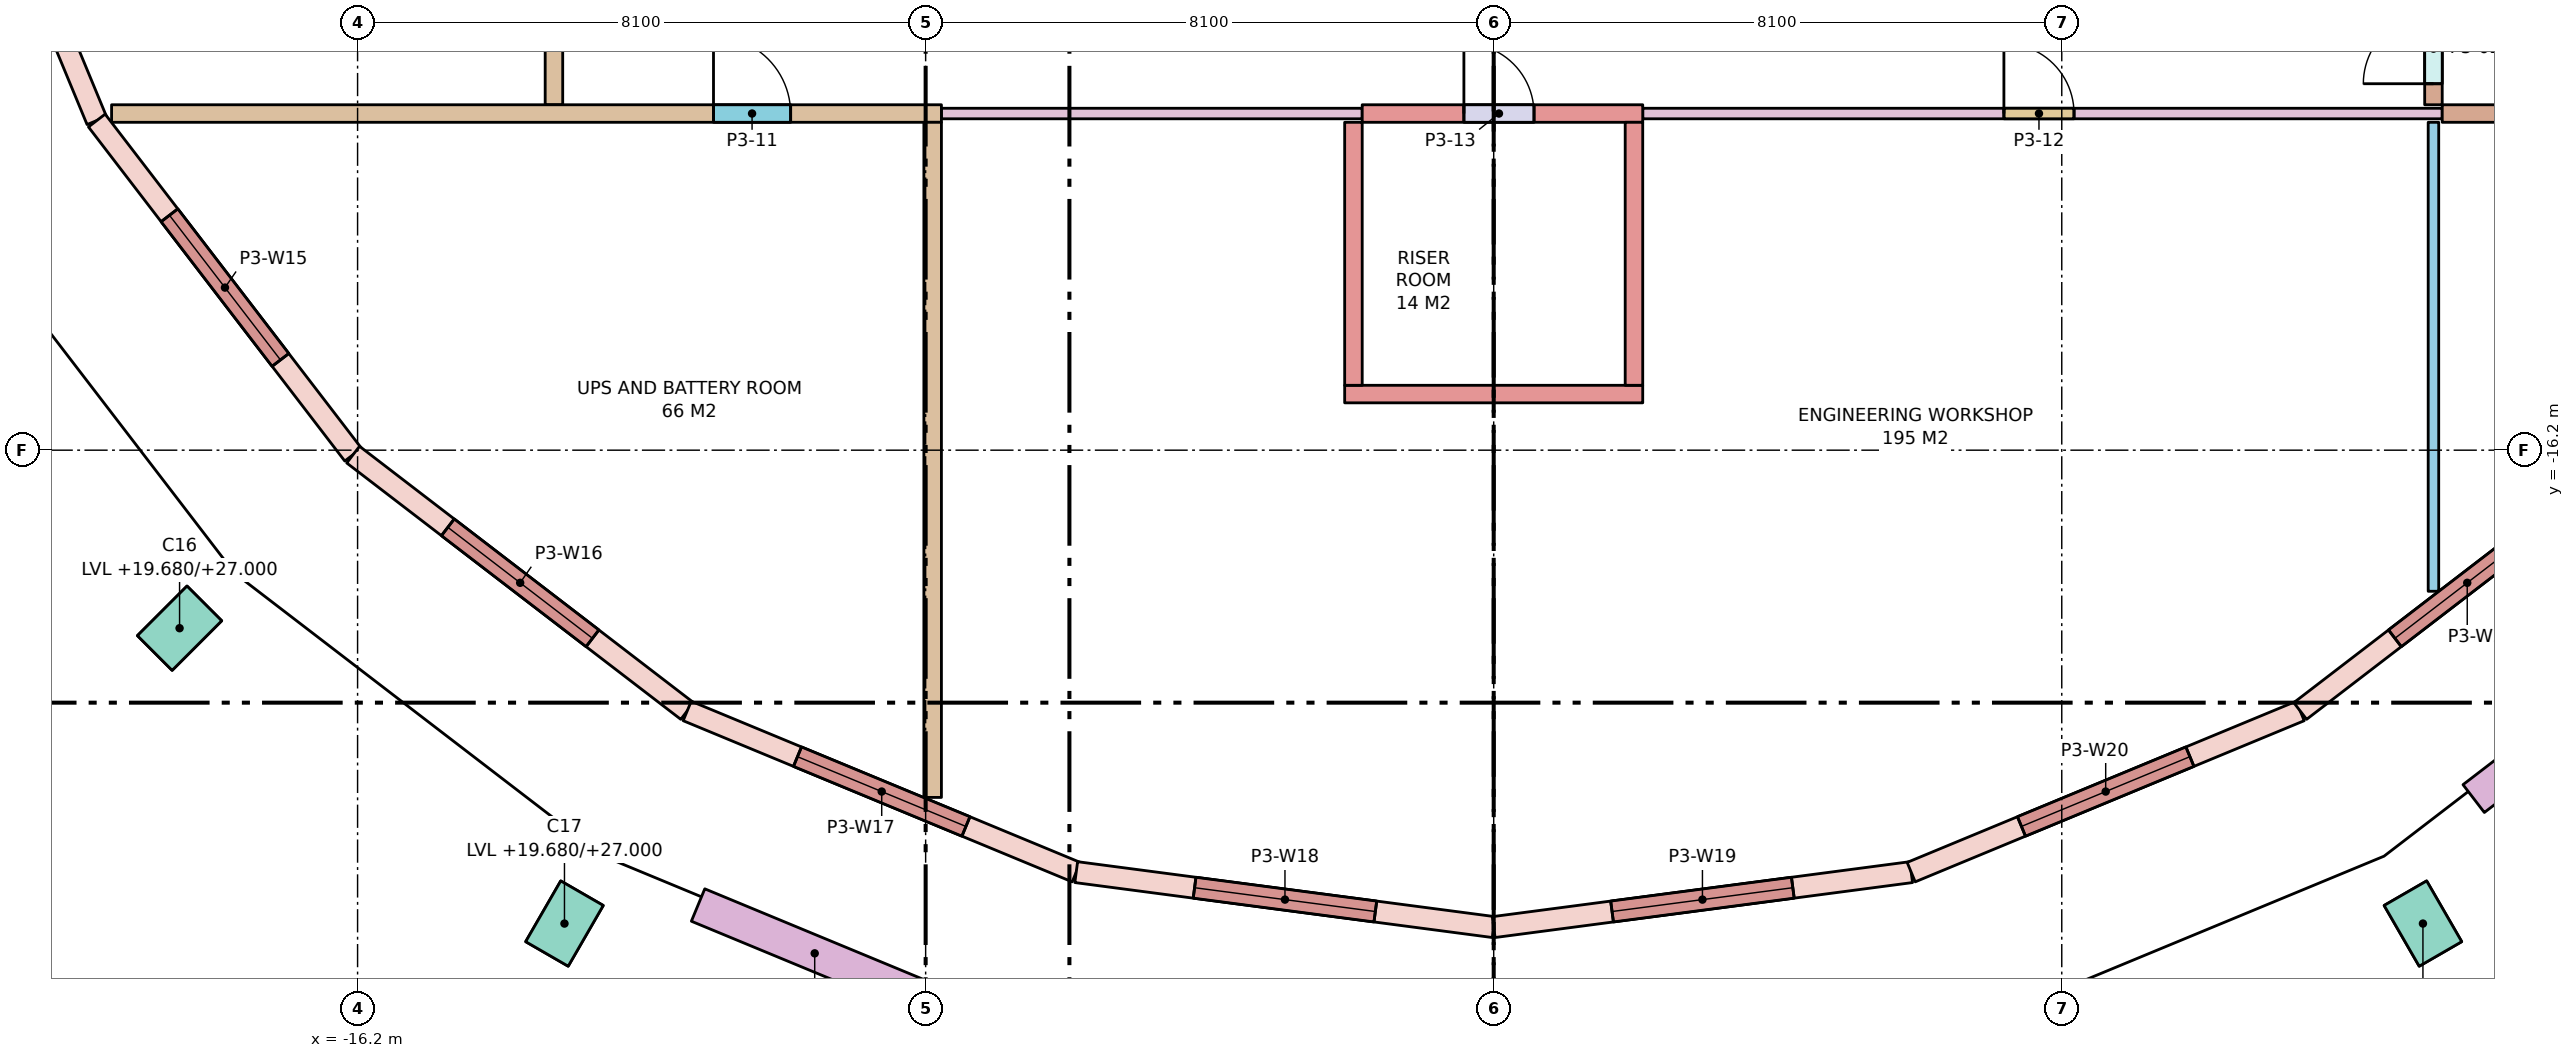
"""IFC4 building model, lengths in metres.
Left out: names, types, materials, properties, quantities, classifications, styles, units other than length and angle.
Written with IfcOpenShell. Run it as: python <this file> out.ifc"""

import sys

from ifc_helpers import new_model, si_unit, direction, frame, frame_2d, origin, origin_2d, place, context, subcontext, project, spatial, rectangle, extrude, element, fill, save


model = new_model("IFC4")
c1 = context("Model", 3, precision=1e-05, world=origin(), true_north=direction((0.0, 1.0)))
c2 = subcontext(c1, "Body", "Model", "MODEL_VIEW")
j1 = project(units=[si_unit("LENGTHUNIT", "METRE"), si_unit("PLANEANGLEUNIT", "RADIAN")], contexts=[c1])
p1 = place(None, origin())
s1 = spatial("IfcSite", under=j1, at=p1, CompositionType="ELEMENT")
p2 = place(p1, origin())
s2 = spatial("IfcBuilding", under=s1, at=p2, CompositionType="ELEMENT")
p3 = place(p2, frame((0.0, 0.0, 20.0)))
s3 = spatial("IfcBuildingStorey", under=s2, at=p3, CompositionType="ELEMENT", Elevation=20.0)
for number, where, z_axis, x_axis in (
    (1, (-18.738, -18.738, -0.32), (0.0, 0.0, 1.0), (0.707, -0.707, 0.0)),
    (2, (-13.25, -22.95, -0.32), (0.0, 0.0, 1.0), (0.866, -0.5, 0.0)),
    (3, (13.25, -22.95, -0.32), (0.0, 0.0, 1.0), (0.866, 0.5, 0.0)),
):
    element("IfcColumn", number, at=place(p3, frame(where, z_axis=z_axis, x_axis=x_axis)), inside=s3, PredefinedType="COLUMN", context=c2, shape_type="SweptSolid", body=[
        extrude(rectangle(XDim=0.7, YDim=1.0, at=origin_2d()), origin(), (0.0, 0.0, 1.0), 7.32),
    ])
p4 = place(p3, frame((-22.216, -5.953, 0.0), z_axis=(0.0, 0.0, 1.0), x_axis=(0.382671411433, -0.923884511653, 0.0)))
e4 = element("IfcWall", 4, at=p4, inside=s3, PredefinedType="STANDARD", context=c2, shape_type="SweptSolid", body=[
    extrude(rectangle(XDim=6.004, YDim=0.3, at=frame_2d((3.002, 0.0))), origin(), (0.0, 0.0, 1.0), 6.72),
])
p5 = place(p4, frame((1.702, 0.0, 0.8)))
e5 = element("IfcOpeningElement", 5, at=p5, cuts=e4, PredefinedType="OPENING", context=c2, shape_type="SweptSolid", body=[
    extrude(rectangle(XDim=2.6, YDim=5.4, at=frame_2d((1.3, 2.7))), frame((0.0, 0.16, 0.0), z_axis=(0.0, -1.0, 0.0), x_axis=(1.0, 0.0, 0.0)), (0.0, 0.0, 1.0), 0.32),
])
p6 = place(p3, frame((-19.919, -11.5, 0.0), z_axis=(0.0, 0.0, 1.0), x_axis=(0.608778912074, -0.793339924758, 0.0)))
e6 = element("IfcWall", 6, at=p6, inside=s3, PredefinedType="STANDARD", context=c2, shape_type="SweptSolid", body=[
    extrude(rectangle(XDim=6.004, YDim=0.3, at=frame_2d((3.002, 0.0))), origin(), (0.0, 0.0, 1.0), 6.72),
])
p7 = place(p6, frame((1.702, 0.0, 0.8)))
e7 = element("IfcOpeningElement", 7, at=p7, cuts=e6, PredefinedType="OPENING", context=c2, shape_type="SweptSolid", body=[
    extrude(rectangle(XDim=2.6, YDim=5.4, at=frame_2d((1.3, 2.7))), frame((0.0, 0.16, 0.0), z_axis=(0.0, -1.0, 0.0), x_axis=(1.0, 0.0, 0.0)), (0.0, 0.0, 1.0), 0.32),
])
p8 = place(p3, frame((-16.263, -16.263, 0.0), z_axis=(0.0, 0.0, 1.0), x_axis=(0.793339924758, -0.608778912074, 0.0)))
e8 = element("IfcWall", 8, at=p8, inside=s3, PredefinedType="STANDARD", context=c2, shape_type="SweptSolid", body=[
    extrude(rectangle(XDim=6.004, YDim=0.3, at=frame_2d((3.002, 0.0))), origin(), (0.0, 0.0, 1.0), 6.72),
])
p9 = place(p8, frame((1.702, 0.0, 0.8)))
e9 = element("IfcOpeningElement", 9, at=p9, cuts=e8, PredefinedType="OPENING", context=c2, shape_type="SweptSolid", body=[
    extrude(rectangle(XDim=2.6, YDim=5.4, at=frame_2d((1.3, 2.7))), frame((0.0, 0.16, 0.0), z_axis=(0.0, -1.0, 0.0), x_axis=(1.0, 0.0, 0.0)), (0.0, 0.0, 1.0), 0.32),
])
p10 = place(p3, frame((-11.5, -19.919, 0.0), z_axis=(0.0, 0.0, 1.0), x_axis=(0.923884511653, -0.382671411433, 0.0)))
e10 = element("IfcWall", 10, at=p10, inside=s3, PredefinedType="STANDARD", context=c2, shape_type="SweptSolid", body=[
    extrude(rectangle(XDim=6.004, YDim=0.3, at=frame_2d((3.002, 0.0))), origin(), (0.0, 0.0, 1.0), 6.72),
])
p11 = place(p10, frame((1.702, 0.0, 0.8)))
e11 = element("IfcOpeningElement", 11, at=p11, cuts=e10, PredefinedType="OPENING", context=c2, shape_type="SweptSolid", body=[
    extrude(rectangle(XDim=2.6, YDim=5.4, at=frame_2d((1.3, 2.7))), frame((0.0, 0.16, 0.0), z_axis=(0.0, -1.0, 0.0), x_axis=(1.0, 0.0, 0.0)), (0.0, 0.0, 1.0), 0.32),
])
p12 = place(p3, frame((-5.953, -22.216, 0.0), z_axis=(0.0, 0.0, 1.0), x_axis=(0.991445297315, -0.130522880875, 0.0)))
e12 = element("IfcWall", 12, at=p12, inside=s3, PredefinedType="STANDARD", context=c2, shape_type="SweptSolid", body=[
    extrude(rectangle(XDim=6.004, YDim=0.3, at=frame_2d((3.002, 0.0))), origin(), (0.0, 0.0, 1.0), 6.72),
])
p13 = place(p12, frame((1.702, 0.0, 0.8)))
e13 = element("IfcOpeningElement", 13, at=p13, cuts=e12, PredefinedType="OPENING", context=c2, shape_type="SweptSolid", body=[
    extrude(rectangle(XDim=2.6, YDim=5.4, at=frame_2d((1.3, 2.7))), frame((0.0, 0.16, 0.0), z_axis=(0.0, -1.0, 0.0), x_axis=(1.0, 0.0, 0.0)), (0.0, 0.0, 1.0), 0.32),
])
p14 = place(p3, frame((0.0, -23.0, 0.0), z_axis=(0.0, 0.0, 1.0), x_axis=(0.991445297315, 0.130522880875, 0.0)))
e14 = element("IfcWall", 14, at=p14, inside=s3, PredefinedType="STANDARD", context=c2, shape_type="SweptSolid", body=[
    extrude(rectangle(XDim=6.004, YDim=0.3, at=frame_2d((3.002, 0.0))), origin(), (0.0, 0.0, 1.0), 6.72),
])
p15 = place(p14, frame((1.702, 0.0, 0.8)))
e15 = element("IfcOpeningElement", 15, at=p15, cuts=e14, PredefinedType="OPENING", context=c2, shape_type="SweptSolid", body=[
    extrude(rectangle(XDim=2.6, YDim=5.4, at=frame_2d((1.3, 2.7))), frame((0.0, 0.16, 0.0), z_axis=(0.0, -1.0, 0.0), x_axis=(1.0, 0.0, 0.0)), (0.0, 0.0, 1.0), 0.32),
])
p16 = place(p3, frame((5.953, -22.216, 0.0), z_axis=(0.0, 0.0, 1.0), x_axis=(0.923884511653, 0.382671411433, 0.0)))
e16 = element("IfcWall", 16, at=p16, inside=s3, PredefinedType="STANDARD", context=c2, shape_type="SweptSolid", body=[
    extrude(rectangle(XDim=6.004, YDim=0.3, at=frame_2d((3.002, 0.0))), origin(), (0.0, 0.0, 1.0), 6.72),
])
p17 = place(p16, frame((1.702, 0.0, 0.8)))
e17 = element("IfcOpeningElement", 17, at=p17, cuts=e16, PredefinedType="OPENING", context=c2, shape_type="SweptSolid", body=[
    extrude(rectangle(XDim=2.6, YDim=5.4, at=frame_2d((1.3, 2.7))), frame((0.0, 0.16, 0.0), z_axis=(0.0, -1.0, 0.0), x_axis=(1.0, 0.0, 0.0)), (0.0, 0.0, 1.0), 0.32),
])
p18 = place(p3, frame((11.5, -19.919, 0.0), z_axis=(0.0, 0.0, 1.0), x_axis=(0.793339924758, 0.608778912074, 0.0)))
e18 = element("IfcWall", 18, at=p18, inside=s3, PredefinedType="STANDARD", context=c2, shape_type="SweptSolid", body=[
    extrude(rectangle(XDim=6.004, YDim=0.3, at=frame_2d((3.002, 0.0))), origin(), (0.0, 0.0, 1.0), 6.72),
])
p19 = place(p18, frame((1.702, 0.0, 0.8)))
e19 = element("IfcOpeningElement", 19, at=p19, cuts=e18, PredefinedType="OPENING", context=c2, shape_type="SweptSolid", body=[
    extrude(rectangle(XDim=2.6, YDim=5.4, at=frame_2d((1.3, 2.7))), frame((0.0, 0.16, 0.0), z_axis=(0.0, -1.0, 0.0), x_axis=(1.0, 0.0, 0.0)), (0.0, 0.0, 1.0), 0.32),
])
p20 = place(p3, frame((-11.345, -22.685, 0.0), z_axis=(0.0, 0.0, 1.0), x_axis=(0.923885420167, -0.382669217998, 0.0)))
e20 = element("IfcWall", 20, at=p20, inside=s3, PredefinedType="PARAPET", context=c2, shape_type="SweptSolid", body=[
    extrude(rectangle(XDim=3.6, YDim=0.5, at=frame_2d((1.8, 0.0))), origin(), (0.0, 0.0, 1.0), 0.9),
])
p21 = place(p3, frame((13.974, -21.167, 0.0), z_axis=(0.0, 0.0, 1.0), x_axis=(0.793359599829, 0.608753271334, 0.0)))
e21 = element("IfcWall", 21, at=p21, inside=s3, PredefinedType="PARAPET", context=c2, shape_type="SweptSolid", body=[
    extrude(rectangle(XDim=3.6, YDim=0.5, at=frame_2d((1.8, 0.0))), origin(), (0.0, 0.0, 1.0), 0.9),
])
p22 = place(p3, frame((13.525, -11.4, 0.0), z_axis=(0.0, 0.0, 1.0), x_axis=(1.0, 0.0, 0.0)))
e22 = element("IfcWall", 22, at=p22, inside=s3, PredefinedType="STANDARD", context=c2, shape_type="SweptSolid", body=[
    extrude(rectangle(XDim=3.6, YDim=0.25, at=frame_2d((1.8, 0.0))), origin(), (0.0, 0.0, 1.0), 6.72),
])
p23 = place(p3, frame((13.4, -18.212, 0.0), z_axis=(0.0, 0.0, 1.0), x_axis=(0.0, 1.0, 0.0)))
e23 = element("IfcWall", 23, at=p23, inside=s3, PredefinedType="PARTITIONING", context=c2, shape_type="SweptSolid", body=[
    extrude(rectangle(XDim=6.687, YDim=0.15, at=frame_2d((3.343, 0.0))), origin(), (0.0, 0.0, 1.0), 6.72),
])
p24 = place(p3, frame((13.4, -11.275, 0.0), z_axis=(0.0, 0.0, 1.0), x_axis=(0.0, 1.0, 0.0)))
e24 = element("IfcWall", 24, at=p24, inside=s3, PredefinedType="STANDARD", context=c2, shape_type="SweptSolid", body=[
    extrude(rectangle(XDim=9.35, YDim=0.25, at=frame_2d((4.675, 0.0))), origin(), (0.0, 0.0, 1.0), 6.72),
])
p25 = place(p24, frame((0.3, 0.0, 0.0)))
e25 = element("IfcOpeningElement", 25, at=p25, cuts=e24, PredefinedType="OPENING", context=c2, shape_type="SweptSolid", body=[
    extrude(rectangle(XDim=1.0, YDim=2.1, at=frame_2d((0.5, 1.05))), frame((0.0, 0.135, 0.0), z_axis=(0.0, -1.0, 0.0), x_axis=(1.0, 0.0, 0.0)), (0.0, 0.0, 1.0), 0.27),
])
p26 = place(p3, frame((-1.875, -11.4, 0.0), z_axis=(0.0, 0.0, 1.0), x_axis=(1.0, 0.0, 0.0)))
e26 = element("IfcWall", 26, at=p26, inside=s3, PredefinedType="PARTITIONING", context=c2, shape_type="SweptSolid", body=[
    extrude(rectangle(XDim=4.0, YDim=0.25, at=frame_2d((2.0, 0.0))), origin(), (0.0, 0.0, 1.0), 6.72),
])
p27 = place(p26, frame((1.45, 0.0, 0.0)))
e27 = element("IfcOpeningElement", 27, at=p27, cuts=e26, PredefinedType="OPENING", context=c2, shape_type="SweptSolid", body=[
    extrude(rectangle(XDim=1.0, YDim=2.1, at=frame_2d((0.5, 1.05))), frame((0.0, 0.135, 0.0), z_axis=(0.0, -1.0, 0.0), x_axis=(1.0, 0.0, 0.0)), (0.0, 0.0, 1.0), 0.27),
])
p28 = place(p3, frame((-13.4, -11.275, 0.0), z_axis=(0.0, 0.0, 1.0), x_axis=(0.0, 1.0, 0.0)))
e28 = element("IfcWall", 28, at=p28, inside=s3, PredefinedType="PARTITIONING", context=c2, shape_type="SweptSolid", body=[
    extrude(rectangle(XDim=10.15, YDim=0.25, at=frame_2d((5.075, 0.0))), origin(), (0.0, 0.0, 1.0), 6.72),
])
p29 = place(p28, frame((4.55, 0.0, 0.0)))
e29 = element("IfcOpeningElement", 29, at=p29, cuts=e28, PredefinedType="OPENING", context=c2, shape_type="SweptSolid", body=[
    extrude(rectangle(XDim=1.1, YDim=2.1, at=frame_2d((0.55, 1.05))), frame((0.0, 0.135, 0.0), z_axis=(0.0, -1.0, 0.0), x_axis=(1.0, 0.0, 0.0)), (0.0, 0.0, 1.0), 0.27),
])
p30 = place(p3, frame((-7.875, -11.4, 0.0), z_axis=(0.0, 0.0, 1.0), x_axis=(1.0, 0.0, 0.0)))
e30 = element("IfcWall", 30, at=p30, inside=s3, PredefinedType="PARTITIONING", context=c2, shape_type="SweptSolid", body=[
    extrude(rectangle(XDim=6.0, YDim=0.15, at=frame_2d((3.0, 0.0))), origin(), (0.0, 0.0, 1.0), 6.72),
])
p31 = place(p3, frame((2.125, -11.4, 0.0), z_axis=(0.0, 0.0, 1.0), x_axis=(1.0, 0.0, 0.0)))
e31 = element("IfcWall", 31, at=p31, inside=s3, PredefinedType="PARTITIONING", context=c2, shape_type="SweptSolid", body=[
    extrude(rectangle(XDim=11.4, YDim=0.15, at=frame_2d((5.7, 0.0))), origin(), (0.0, 0.0, 1.0), 6.72),
])
p32 = place(p31, frame((5.15, 0.0, 0.0)))
e32 = element("IfcOpeningElement", 32, at=p32, cuts=e31, PredefinedType="OPENING", context=c2, shape_type="SweptSolid", body=[
    extrude(rectangle(XDim=1.0, YDim=2.1, at=frame_2d((0.5, 1.05))), frame((0.0, 0.085, 0.0), z_axis=(0.0, -1.0, 0.0), x_axis=(1.0, 0.0, 0.0)), (0.0, 0.0, 1.0), 0.17),
])
p33 = place(p3, frame((-2.125, -15.4, 0.0), z_axis=(0.0, 0.0, 1.0), x_axis=(1.0, 0.0, 0.0)))
e33 = element("IfcWall", 33, at=p33, inside=s3, PredefinedType="PARTITIONING", context=c2, shape_type="SweptSolid", body=[
    extrude(rectangle(XDim=4.25, YDim=0.25, at=frame_2d((2.125, 0.0))), origin(), (0.0, 0.0, 1.0), 6.72),
])
for number, where, z_axis, x_axis in (
    (34, (-2.0, -15.275, 0.0), (0.0, 0.0, 1.0), (0.0, 1.0, 0.0)),
    (35, (2.0, -15.275, 0.0), (0.0, 0.0, 1.0), (0.0, 1.0, 0.0)),
):
    element("IfcWall", number, at=place(p3, frame(where, z_axis=z_axis, x_axis=x_axis)), inside=s3, PredefinedType="PARTITIONING", context=c2, shape_type="SweptSolid", body=[
        extrude(rectangle(XDim=3.75, YDim=0.25, at=frame_2d((1.875, 0.0))), origin(), (0.0, 0.0, 1.0), 6.72),
    ])
p34 = place(p3, frame((-19.708, -11.4, 0.0), z_axis=(0.0, 0.0, 1.0), x_axis=(1.0, 0.0, 0.0)))
e36 = element("IfcWall", 36, at=p34, inside=s3, PredefinedType="PARTITIONING", context=c2, shape_type="SweptSolid", body=[
    extrude(rectangle(XDim=11.833, YDim=0.25, at=frame_2d((5.916, 0.0))), origin(), (0.0, 0.0, 1.0), 6.72),
])
p35 = place(p34, frame((8.583, 0.0, 0.0)))
e37 = element("IfcOpeningElement", 37, at=p35, cuts=e36, PredefinedType="OPENING", context=c2, shape_type="SweptSolid", body=[
    extrude(rectangle(XDim=1.1, YDim=2.1, at=frame_2d((0.55, 1.05))), frame((0.0, 0.135, 0.0), z_axis=(0.0, -1.0, 0.0), x_axis=(1.0, 0.0, 0.0)), (0.0, 0.0, 1.0), 0.27),
])
p36 = place(p3, frame((-8.0, -21.151, 0.0), z_axis=(0.0, 0.0, 1.0), x_axis=(0.0, 1.0, 0.0)))
e38 = element("IfcWall", 38, at=p36, inside=s3, PredefinedType="PARTITIONING", context=c2, shape_type="SweptSolid", body=[
    extrude(rectangle(XDim=9.626, YDim=0.25, at=frame_2d((4.813, 0.0))), origin(), (0.0, 0.0, 1.0), 6.72),
])
p37 = place(p7, origin())
e39 = element("IfcWindow", 39, at=p37, inside=s3, PartitioningType="SINGLE_PANEL", PredefinedType="WINDOW", context=c2, shape_type="SweptSolid", body=[
    extrude(rectangle(XDim=2.6, YDim=5.4, at=frame_2d((1.3, 2.7))), frame((0.0, 0.03, 0.0), z_axis=(0.0, -1.0, 0.0), x_axis=(1.0, 0.0, 0.0)), (0.0, 0.0, 1.0), 0.06),
])
fill(e7, e39)
p38 = place(p9, origin())
e40 = element("IfcWindow", 40, at=p38, inside=s3, PartitioningType="SINGLE_PANEL", PredefinedType="WINDOW", context=c2, shape_type="SweptSolid", body=[
    extrude(rectangle(XDim=2.6, YDim=5.4, at=frame_2d((1.3, 2.7))), frame((0.0, 0.03, 0.0), z_axis=(0.0, -1.0, 0.0), x_axis=(1.0, 0.0, 0.0)), (0.0, 0.0, 1.0), 0.06),
])
fill(e9, e40)
p39 = place(p11, origin())
e41 = element("IfcWindow", 41, at=p39, inside=s3, PartitioningType="SINGLE_PANEL", PredefinedType="WINDOW", context=c2, shape_type="SweptSolid", body=[
    extrude(rectangle(XDim=2.6, YDim=5.4, at=frame_2d((1.3, 2.7))), frame((0.0, 0.03, 0.0), z_axis=(0.0, -1.0, 0.0), x_axis=(1.0, 0.0, 0.0)), (0.0, 0.0, 1.0), 0.06),
])
fill(e11, e41)
p40 = place(p13, origin())
e42 = element("IfcWindow", 42, at=p40, inside=s3, PartitioningType="SINGLE_PANEL", PredefinedType="WINDOW", context=c2, shape_type="SweptSolid", body=[
    extrude(rectangle(XDim=2.6, YDim=5.4, at=frame_2d((1.3, 2.7))), frame((0.0, 0.03, 0.0), z_axis=(0.0, -1.0, 0.0), x_axis=(1.0, 0.0, 0.0)), (0.0, 0.0, 1.0), 0.06),
])
fill(e13, e42)
p41 = place(p15, origin())
e43 = element("IfcWindow", 43, at=p41, inside=s3, PartitioningType="SINGLE_PANEL", PredefinedType="WINDOW", context=c2, shape_type="SweptSolid", body=[
    extrude(rectangle(XDim=2.6, YDim=5.4, at=frame_2d((1.3, 2.7))), frame((0.0, 0.03, 0.0), z_axis=(0.0, -1.0, 0.0), x_axis=(1.0, 0.0, 0.0)), (0.0, 0.0, 1.0), 0.06),
])
fill(e15, e43)
p42 = place(p17, origin())
e44 = element("IfcWindow", 44, at=p42, inside=s3, PartitioningType="SINGLE_PANEL", PredefinedType="WINDOW", context=c2, shape_type="SweptSolid", body=[
    extrude(rectangle(XDim=2.6, YDim=5.4, at=frame_2d((1.3, 2.7))), frame((0.0, 0.03, 0.0), z_axis=(0.0, -1.0, 0.0), x_axis=(1.0, 0.0, 0.0)), (0.0, 0.0, 1.0), 0.06),
])
fill(e17, e44)
p43 = place(p19, origin())
e45 = element("IfcWindow", 45, at=p43, inside=s3, PartitioningType="SINGLE_PANEL", PredefinedType="WINDOW", context=c2, shape_type="SweptSolid", body=[
    extrude(rectangle(XDim=2.6, YDim=5.4, at=frame_2d((1.3, 2.7))), frame((0.0, 0.03, 0.0), z_axis=(0.0, -1.0, 0.0), x_axis=(1.0, 0.0, 0.0)), (0.0, 0.0, 1.0), 0.06),
])
fill(e19, e45)
p44 = place(p25, origin())
e46 = element("IfcDoor", 46, at=p44, inside=s3, OperationType="SINGLE_SWING_LEFT", PredefinedType="DOOR", context=c2, shape_type="SweptSolid", body=[
    extrude(rectangle(XDim=1.0, YDim=2.1, at=frame_2d((0.5, 1.05))), frame((0.0, 0.025, 0.0), z_axis=(0.0, -1.0, 0.0), x_axis=(1.0, 0.0, 0.0)), (0.0, 0.0, 1.0), 0.05),
])
fill(e25, e46)
p45 = place(p35, origin())
e47 = element("IfcDoor", 47, at=p45, inside=s3, OperationType="SINGLE_SWING_LEFT", PredefinedType="DOOR", context=c2, shape_type="SweptSolid", body=[
    extrude(rectangle(XDim=1.1, YDim=2.1, at=frame_2d((0.55, 1.05))), frame((0.0, 0.025, 0.0), z_axis=(0.0, -1.0, 0.0), x_axis=(1.0, 0.0, 0.0)), (0.0, 0.0, 1.0), 0.05),
])
fill(e37, e47)
p46 = place(p32, origin())
e48 = element("IfcDoor", 48, at=p46, inside=s3, OperationType="SINGLE_SWING_LEFT", PredefinedType="DOOR", context=c2, shape_type="SweptSolid", body=[
    extrude(rectangle(XDim=1.0, YDim=2.1, at=frame_2d((0.5, 1.05))), frame((0.0, 0.025, 0.0), z_axis=(0.0, -1.0, 0.0), x_axis=(1.0, 0.0, 0.0)), (0.0, 0.0, 1.0), 0.05),
])
fill(e32, e48)
p47 = place(p27, origin())
e49 = element("IfcDoor", 49, at=p47, inside=s3, OperationType="SINGLE_SWING_LEFT", PredefinedType="DOOR", context=c2, shape_type="SweptSolid", body=[
    extrude(rectangle(XDim=1.0, YDim=2.1, at=frame_2d((0.5, 1.05))), frame((0.0, 0.025, 0.0), z_axis=(0.0, -1.0, 0.0), x_axis=(1.0, 0.0, 0.0)), (0.0, 0.0, 1.0), 0.05),
])
fill(e27, e49)
save(model, sys.argv[1])
